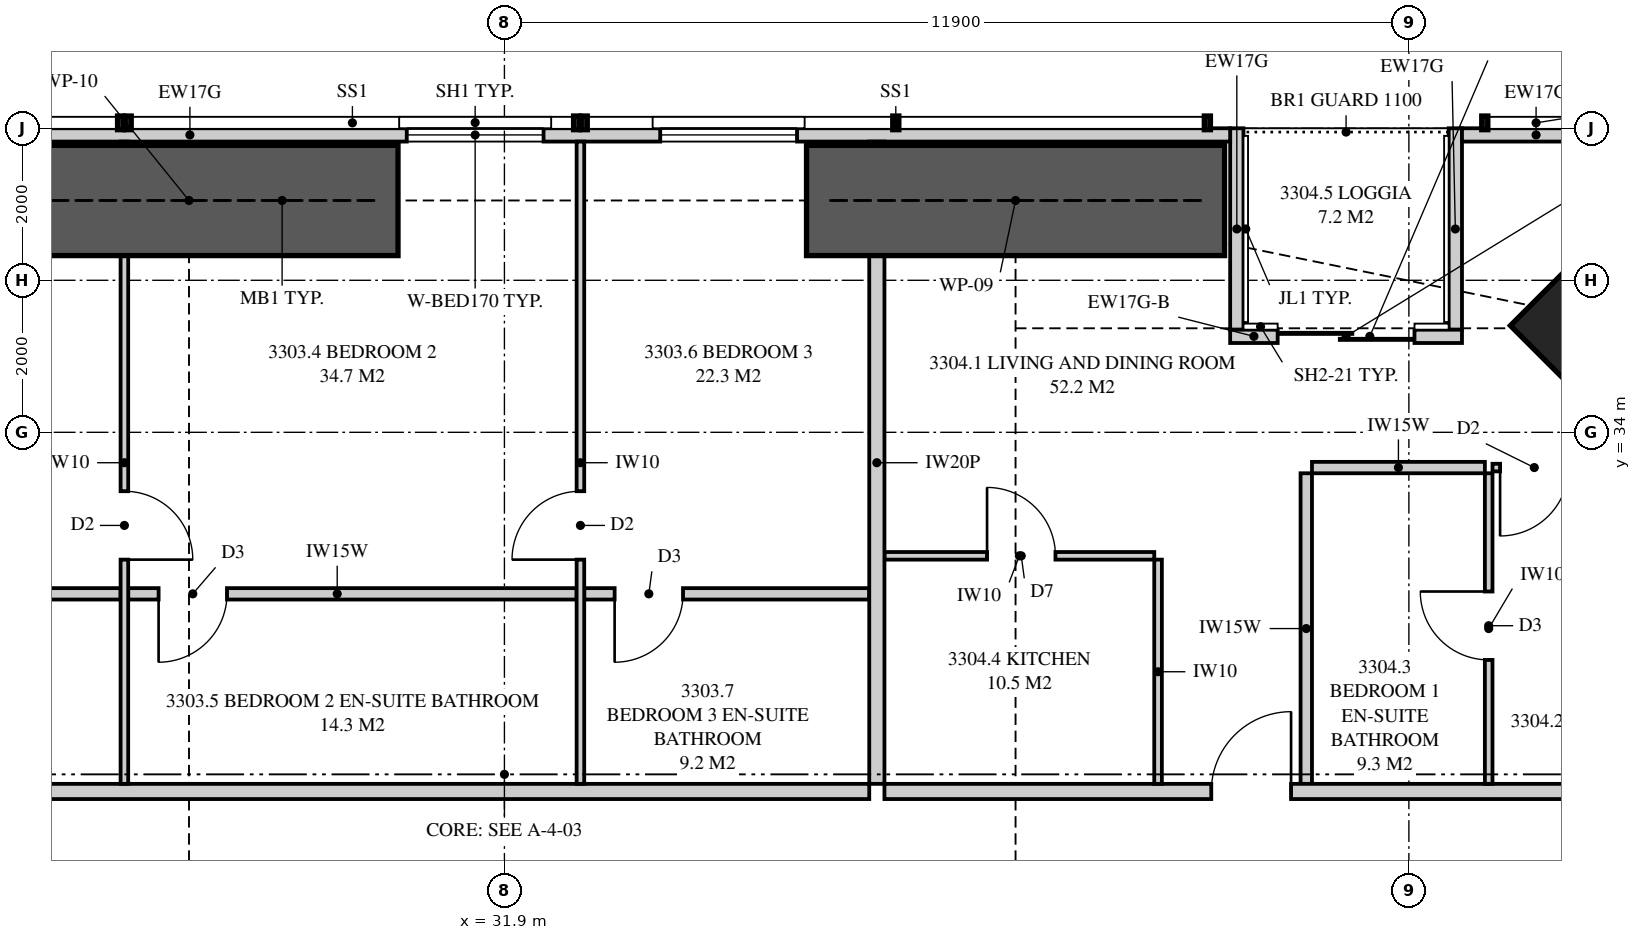
"""IFC4 building model, lengths in metres.
Left out: names, types, materials, properties, quantities, classifications, styles, units other than length and angle.
Written with IfcOpenShell. Run it as: python <this file> out.ifc"""

import sys

from ifc_helpers import new_model, si_unit, direction, frame, frame_2d, origin, origin_2d, place, context, subcontext, project, spatial, polyline, rectangle, outline, extrude, element, fill, save


model = new_model("IFC4")
c1 = context("Model", 3, precision=1e-05, world=origin(), true_north=direction((0.0, 1.0)))
c2 = subcontext(c1, "Body", "Model", "MODEL_VIEW")
j1 = project(units=[si_unit("LENGTHUNIT", "METRE"), si_unit("PLANEANGLEUNIT", "RADIAN")], contexts=[c1])
p1 = place(None, origin())
s1 = spatial("IfcSite", under=j1, at=p1, CompositionType="ELEMENT")
p2 = place(p1, origin())
s2 = spatial("IfcBuilding", under=s1, at=p2, CompositionType="ELEMENT")
p3 = place(p2, frame((0.0, 0.0, 121.6)))
s3 = spatial("IfcBuildingStorey", under=s2, at=p3, CompositionType="ELEMENT", Elevation=121.6)
p4 = place(p3, frame((46.869, 35.369, 0.0), z_axis=(0.0, 0.0, 1.0), x_axis=(-0.707106781187, -0.707106781187, 0.0)))
e1 = element("IfcColumn", 1, at=p4, inside=s3, PredefinedType="COLUMN", context=c2, shape_type="SweptSolid", body=[
    extrude(rectangle(XDim=2.4, YDim=2.5, at=origin_2d()), origin(), (0.0, 0.0, 1.0), 3.35),
])
p5 = place(p3, frame((46.449, 37.913, 0.0), z_axis=(0.0, 0.0, 1.0), x_axis=(-1.0, 0.0, 0.0)))
e2 = element("IfcWall", 2, at=p5, inside=s3, PredefinedType="SOLIDWALL", context=c2, shape_type="SweptSolid", body=[
    extrude(rectangle(XDim=1.95, YDim=0.175, at=frame_2d((0.975, 0.0))), origin(), (0.0, 0.0, 1.0), 3.11),
])
p6 = place(p3, frame((41.449, 37.913, 0.0), z_axis=(0.0, 0.0, 1.0), x_axis=(-1.0, 0.0, 0.0)))
e3 = element("IfcWall", 3, at=p6, inside=s3, PredefinedType="SOLIDWALL", context=c2, shape_type="SweptSolid", body=[
    extrude(outline(polyline([(0.0, 0.0), (27.374, 0.0), (27.374, 3.11), (24.777, 3.11), (24.777, 2.15), (24.732, 2.15), (24.732, 3.11), (24.574, 3.11), (24.574, 2.15), (2.824, 2.15), (2.824, 3.11), (2.666, 3.11), (2.666, 2.15), (2.62, 2.15), (2.62, 3.11), (0.0, 3.11), (0.0, 0.0)])), frame((0.0, 0.087, 0.0), z_axis=(0.0, -1.0, 0.0), x_axis=(1.0, 0.0, 0.0)), (0.0, 0.0, 1.0), 0.175),
])
p7 = place(p6, frame((5.699, 0.0, 0.4)))
e4 = element("IfcOpeningElement", 4, at=p7, cuts=e3, PredefinedType="OPENING", context=c2, shape_type="SweptSolid", body=[
    extrude(rectangle(XDim=1.8, YDim=1.7, at=frame_2d((0.9, 0.85))), frame((0.0, 0.097, 0.0), z_axis=(0.0, -1.0, 0.0), x_axis=(1.0, 0.0, 0.0)), (0.0, 0.0, 1.0), 0.195),
])
p8 = place(p6, frame((9.034, 0.0, 0.4)))
e5 = element("IfcOpeningElement", 5, at=p8, cuts=e3, PredefinedType="OPENING", context=c2, shape_type="SweptSolid", body=[
    extrude(rectangle(XDim=1.8, YDim=1.7, at=frame_2d((0.9, 0.85))), frame((0.0, 0.097, 0.0), z_axis=(0.0, -1.0, 0.0), x_axis=(1.0, 0.0, 0.0)), (0.0, 0.0, 1.0), 0.195),
])
p9 = place(p6, frame((16.558, 0.0, 0.4)))
e6 = element("IfcOpeningElement", 6, at=p9, cuts=e3, PredefinedType="OPENING", context=c2, shape_type="SweptSolid", body=[
    extrude(rectangle(XDim=1.8, YDim=1.7, at=frame_2d((0.9, 0.85))), frame((0.0, 0.097, 0.0), z_axis=(0.0, -1.0, 0.0), x_axis=(1.0, 0.0, 0.0)), (0.0, 0.0, 1.0), 0.195),
])
p10 = place(p6, frame((19.724, 0.0, 0.4)))
e7 = element("IfcOpeningElement", 7, at=p10, cuts=e3, PredefinedType="OPENING", context=c2, shape_type="SweptSolid", body=[
    extrude(rectangle(XDim=1.8, YDim=1.7, at=frame_2d((0.9, 0.85))), frame((0.0, 0.097, 0.0), z_axis=(0.0, -1.0, 0.0), x_axis=(1.0, 0.0, 0.0)), (0.0, 0.0, 1.0), 0.195),
])
p11 = place(p3, frame((44.499, 35.262, 0.0), z_axis=(0.0, 0.0, 1.0), x_axis=(-1.0, 0.0, 0.0)))
e8 = element("IfcWall", 8, at=p11, inside=s3, PredefinedType="SOLIDWALL", context=c2, shape_type="SweptSolid", body=[
    extrude(rectangle(XDim=2.425, YDim=0.175, at=frame_2d((1.212, 0.0))), origin(), (0.0, 0.0, 1.0), 2.15),
])
p12 = place(p11, frame((0.625, 0.0, 0.0)))
e9 = element("IfcOpeningElement", 9, at=p12, cuts=e8, PredefinedType="OPENING", context=c2, shape_type="SweptSolid", body=[
    extrude(rectangle(XDim=1.8, YDim=2.1, at=frame_2d((0.9, 1.05))), frame((0.0, 0.097, 0.0), z_axis=(0.0, -1.0, 0.0), x_axis=(1.0, 0.0, 0.0)), (0.0, 0.0, 1.0), 0.195),
])
p13 = place(p3, frame((42.074, 35.262, 0.0), z_axis=(0.0, 0.0, 1.0), x_axis=(-1.0, 0.0, 0.0)))
e10 = element("IfcWall", 10, at=p13, inside=s3, PredefinedType="SOLIDWALL", context=c2, shape_type="SweptSolid", body=[
    extrude(rectangle(XDim=0.625, YDim=0.175, at=frame_2d((0.312, 0.0))), origin(), (0.0, 0.0, 1.0), 2.51),
])
p14 = place(p3, frame((44.411, 38.0, 0.0), z_axis=(0.0, 0.0, 1.0), x_axis=(0.0, -1.0, 0.0)))
e11 = element("IfcWall", 11, at=p14, inside=s3, PredefinedType="SOLIDWALL", context=c2, shape_type="SweptSolid", body=[
    extrude(outline(polyline([(0.0, 0.0), (2.65, 0.0), (2.65, 2.15), (1.296, 2.15), (1.296, 3.11), (0.0, 3.11), (0.0, 0.0)])), frame((0.0, 0.087, 0.0), z_axis=(0.0, -1.0, 0.0), x_axis=(1.0, 0.0, 0.0)), (0.0, 0.0, 1.0), 0.175),
])
p15 = place(p3, frame((41.536, 38.0, 0.0), z_axis=(0.0, 0.0, 1.0), x_axis=(0.0, -1.0, 0.0)))
e12 = element("IfcWall", 12, at=p15, inside=s3, PredefinedType="SOLIDWALL", context=c2, shape_type="SweptSolid", body=[
    extrude(outline(polyline([(0.0, 0.0), (2.65, 0.0), (2.65, 2.51), (2.378, 2.51), (2.378, 2.15), (0.709, 2.15), (0.709, 3.11), (0.0, 3.11), (0.0, 0.0)])), frame((0.0, 0.087, 0.0), z_axis=(0.0, -1.0, 0.0), x_axis=(1.0, 0.0, 0.0)), (0.0, 0.0, 1.0), 0.175),
])
p16 = place(p3, frame((36.8, 37.825, 0.0), z_axis=(0.0, 0.0, 1.0), x_axis=(0.0, -1.0, 0.0)))
e13 = element("IfcWall", 13, at=p16, inside=s3, PredefinedType="PARTITIONING", context=c2, shape_type="SweptSolid", body=[
    extrude(outline(polyline([(0.529, 2.15), (0.0, 2.15), (0.0, 0.0), (0.529, 0.0), (0.529, 0.256), (1.021, 0.256), (1.021, 0.0), (8.45, 0.0), (8.45, 3.11), (1.685, 3.11), (1.685, 2.15), (1.021, 2.15), (1.021, 1.894), (0.529, 1.894), (0.529, 2.15)])), frame((0.0, 0.1, 0.0), z_axis=(0.0, -1.0, 0.0), x_axis=(1.0, 0.0, 0.0)), (0.0, 0.0, 1.0), 0.2),
])
p17 = place(p3, frame((17.775, 29.275, 0.0), z_axis=(0.0, 0.0, 1.0), x_axis=(1.0, 0.0, 0.0)))
e14 = element("IfcWall", 14, at=p17, inside=s3, PredefinedType="PARTITIONING", context=c2, shape_type="SweptSolid", body=[
    extrude(outline(polyline([(0.0, 0.0), (18.925, 0.0), (18.925, 3.11), (10.312, 3.11), (10.312, 2.541), (9.638, 2.541), (9.638, 3.11), (0.0, 3.11), (0.0, 0.0)])), frame((0.0, 0.1, 0.0), z_axis=(0.0, -1.0, 0.0), x_axis=(1.0, 0.0, 0.0)), (0.0, 0.0, 1.0), 0.2),
])
p18 = place(p17, frame((3.125, 0.0, 0.0)))
e15 = element("IfcOpeningElement", 15, at=p18, cuts=e14, PredefinedType="OPENING", context=c2, shape_type="SweptSolid", body=[
    extrude(rectangle(XDim=1.05, YDim=2.2, at=frame_2d((0.525, 1.1))), frame((0.0, 0.11, 0.0), z_axis=(0.0, -1.0, 0.0), x_axis=(1.0, 0.0, 0.0)), (0.0, 0.0, 1.0), 0.22),
])
p19 = place(p3, frame((26.9, 37.825, 0.0), z_axis=(0.0, 0.0, 1.0), x_axis=(0.0, -1.0, 0.0)))
e16 = element("IfcWall", 16, at=p19, inside=s3, PredefinedType="PARTITIONING", context=c2, shape_type="SweptSolid", body=[
    extrude(outline(polyline([(0.529, 2.15), (0.0, 2.15), (0.0, 0.0), (0.529, 0.0), (0.529, 0.889), (1.021, 0.889), (1.021, 0.0), (8.45, 0.0), (8.45, 3.11), (1.635, 3.11), (1.635, 2.15), (1.021, 2.15), (1.021, 1.261), (0.529, 1.261), (0.529, 2.15)])), frame((0.0, 0.05, 0.0), z_axis=(0.0, -1.0, 0.0), x_axis=(1.0, 0.0, 0.0)), (0.0, 0.0, 1.0), 0.1),
])
p20 = place(p19, frame((4.6, 0.0, 0.0)))
e17 = element("IfcOpeningElement", 17, at=p20, cuts=e16, PredefinedType="OPENING", context=c2, shape_type="SweptSolid", body=[
    extrude(rectangle(XDim=0.9, YDim=2.1, at=frame_2d((0.45, 1.05))), frame((0.0, 0.06, 0.0), z_axis=(0.0, -1.0, 0.0), x_axis=(1.0, 0.0, 0.0)), (0.0, 0.0, 1.0), 0.12),
])
p21 = place(p3, frame((32.9, 37.825, 0.0), z_axis=(0.0, 0.0, 1.0), x_axis=(0.0, -1.0, 0.0)))
e18 = element("IfcWall", 18, at=p21, inside=s3, PredefinedType="PARTITIONING", context=c2, shape_type="SweptSolid", body=[
    extrude(outline(polyline([(0.0, 0.0), (8.45, 0.0), (8.45, 3.11), (1.635, 3.11), (1.635, 2.15), (0.0, 2.15), (0.0, 3.11), (0.0, 0.0)])), frame((0.0, 0.05, 0.0), z_axis=(0.0, -1.0, 0.0), x_axis=(1.0, 0.0, 0.0)), (0.0, 0.0, 1.0), 0.1),
])
p22 = place(p21, frame((4.6, 0.0, 0.0)))
e19 = element("IfcOpeningElement", 19, at=p22, cuts=e18, PredefinedType="OPENING", context=c2, shape_type="SweptSolid", body=[
    extrude(rectangle(XDim=0.9, YDim=2.1, at=frame_2d((0.45, 1.05))), frame((0.0, 0.06, 0.0), z_axis=(0.0, -1.0, 0.0), x_axis=(1.0, 0.0, 0.0)), (0.0, 0.0, 1.0), 0.12),
])
p23 = place(p3, frame((22.7, 31.875, 0.0), z_axis=(0.0, 0.0, 1.0), x_axis=(1.0, 0.0, 0.0)))
e20 = element("IfcWall", 20, at=p23, inside=s3, PredefinedType="PLUMBINGWALL", context=c2, shape_type="SweptSolid", body=[
    extrude(rectangle(XDim=4.15, YDim=0.15, at=frame_2d((2.075, 0.0))), origin(), (0.0, 0.0, 1.0), 3.11),
])
p24 = place(p23, frame((0.4, 0.0, 0.0)))
e21 = element("IfcOpeningElement", 21, at=p24, cuts=e20, PredefinedType="OPENING", context=c2, shape_type="SweptSolid", body=[
    extrude(rectangle(XDim=0.9, YDim=2.1, at=frame_2d((0.45, 1.05))), frame((0.0, 0.085, 0.0), z_axis=(0.0, -1.0, 0.0), x_axis=(1.0, 0.0, 0.0)), (0.0, 0.0, 1.0), 0.17),
])
p25 = place(p3, frame((26.95, 31.875, 0.0), z_axis=(0.0, 0.0, 1.0), x_axis=(1.0, 0.0, 0.0)))
e22 = element("IfcWall", 22, at=p25, inside=s3, PredefinedType="PLUMBINGWALL", context=c2, shape_type="SweptSolid", body=[
    extrude(outline(polyline([(0.0, 0.0), (5.9, 0.0), (5.9, 3.11), (1.112, 3.11), (1.112, 2.541), (0.488, 2.541), (0.488, 3.11), (0.0, 3.11), (0.0, 0.0)])), frame((0.0, 0.075, 0.0), z_axis=(0.0, -1.0, 0.0), x_axis=(1.0, 0.0, 0.0)), (0.0, 0.0, 1.0), 0.15),
])
p26 = place(p25, frame((0.4, 0.0, 0.0)))
e23 = element("IfcOpeningElement", 23, at=p26, cuts=e22, PredefinedType="OPENING", context=c2, shape_type="SweptSolid", body=[
    extrude(rectangle(XDim=0.9, YDim=2.1, at=frame_2d((0.45, 1.05))), frame((0.0, 0.085, 0.0), z_axis=(0.0, -1.0, 0.0), x_axis=(1.0, 0.0, 0.0)), (0.0, 0.0, 1.0), 0.17),
])
p27 = place(p3, frame((32.95, 31.875, 0.0), z_axis=(0.0, 0.0, 1.0), x_axis=(1.0, 0.0, 0.0)))
e24 = element("IfcWall", 24, at=p27, inside=s3, PredefinedType="PLUMBINGWALL", context=c2, shape_type="SweptSolid", body=[
    extrude(rectangle(XDim=3.75, YDim=0.15, at=frame_2d((1.875, 0.0))), origin(), (0.0, 0.0, 1.0), 3.11),
])
p28 = place(p27, frame((0.4, 0.0, 0.0)))
e25 = element("IfcOpeningElement", 25, at=p28, cuts=e24, PredefinedType="OPENING", context=c2, shape_type="SweptSolid", body=[
    extrude(rectangle(XDim=0.9, YDim=2.1, at=frame_2d((0.45, 1.05))), frame((0.0, 0.085, 0.0), z_axis=(0.0, -1.0, 0.0), x_axis=(1.0, 0.0, 0.0)), (0.0, 0.0, 1.0), 0.17),
])
p29 = place(p3, frame((36.9, 29.275, 0.0), z_axis=(0.0, 0.0, 1.0), x_axis=(1.0, 0.0, 0.0)))
e26 = element("IfcWall", 26, at=p29, inside=s3, PredefinedType="PARTITIONING", context=c2, shape_type="SweptSolid", body=[
    extrude(outline(polyline([(0.0, 0.0), (9.125, 0.0), (9.125, 3.11), (2.062, 3.11), (2.062, 2.541), (1.388, 2.541), (1.388, 3.11), (0.0, 3.11), (0.0, 0.0)])), frame((0.0, 0.1, 0.0), z_axis=(0.0, -1.0, 0.0), x_axis=(1.0, 0.0, 0.0)), (0.0, 0.0, 1.0), 0.2),
])
p30 = place(p29, frame((4.3, 0.0, 0.0)))
e27 = element("IfcOpeningElement", 27, at=p30, cuts=e26, PredefinedType="OPENING", context=c2, shape_type="SweptSolid", body=[
    extrude(rectangle(XDim=1.05, YDim=2.2, at=frame_2d((0.525, 1.1))), frame((0.0, 0.11, 0.0), z_axis=(0.0, -1.0, 0.0), x_axis=(1.0, 0.0, 0.0)), (0.0, 0.0, 1.0), 0.22),
])
p31 = place(p3, frame((44.85, 33.461, 0.0), z_axis=(0.0, 0.0, 1.0), x_axis=(0.0, -1.0, 0.0)))
e28 = element("IfcWall", 28, at=p31, inside=s3, PredefinedType="PARTITIONING", context=c2, shape_type="SweptSolid", body=[
    extrude(rectangle(XDim=4.086, YDim=0.1, at=frame_2d((2.043, 0.0))), origin(), (0.0, 0.0, 1.0), 3.11),
])
p32 = place(p31, frame((1.556, 0.0, 0.0)))
e29 = element("IfcOpeningElement", 29, at=p32, cuts=e28, PredefinedType="OPENING", context=c2, shape_type="SweptSolid", body=[
    extrude(rectangle(XDim=0.9, YDim=2.1, at=frame_2d((0.45, 1.05))), frame((0.0, 0.06, 0.0), z_axis=(0.0, -1.0, 0.0), x_axis=(1.0, 0.0, 0.0)), (0.0, 0.0, 1.0), 0.12),
])
p33 = place(p3, frame((44.9, 33.536, 0.0), z_axis=(0.0, 0.0, 1.0), x_axis=(1.0, 0.0, 0.0)))
e30 = element("IfcWall", 30, at=p33, inside=s3, PredefinedType="PARTITIONING", context=c2, shape_type="SweptSolid", body=[
    extrude(outline(polyline([(0.0, 0.0), (4.6, 0.0), (4.6, 3.11), (3.137, 3.11), (3.137, 2.15), (1.395, 2.15), (1.395, 3.11), (0.0, 3.11), (0.0, 0.0)])), frame((0.0, 0.05, 0.0), z_axis=(0.0, -1.0, 0.0), x_axis=(1.0, 0.0, 0.0)), (0.0, 0.0, 1.0), 0.1),
])
p34 = place(p33, frame((0.1, 0.0, 0.0)))
e31 = element("IfcOpeningElement", 31, at=p34, cuts=e30, PredefinedType="OPENING", context=c2, shape_type="SweptSolid", body=[
    extrude(rectangle(XDim=0.9, YDim=2.1, at=frame_2d((0.45, 1.05))), frame((0.0, 0.06, 0.0), z_axis=(0.0, -1.0, 0.0), x_axis=(1.0, 0.0, 0.0)), (0.0, 0.0, 1.0), 0.12),
])
p35 = place(p3, frame((42.525, 33.536, 0.0), z_axis=(0.0, 0.0, 1.0), x_axis=(1.0, 0.0, 0.0)))
e32 = element("IfcWall", 32, at=p35, inside=s3, PredefinedType="PLUMBINGWALL", context=c2, shape_type="SweptSolid", body=[
    extrude(rectangle(XDim=2.275, YDim=0.15, at=frame_2d((1.138, 0.0))), origin(), (0.0, 0.0, 1.0), 3.11),
])
p36 = place(p3, frame((42.45, 33.461, 0.0), z_axis=(0.0, 0.0, 1.0), x_axis=(0.0, -1.0, 0.0)))
e33 = element("IfcWall", 33, at=p36, inside=s3, PredefinedType="PLUMBINGWALL", context=c2, shape_type="SweptSolid", body=[
    extrude(rectangle(XDim=4.086, YDim=0.15, at=frame_2d((2.043, 0.0))), origin(), (0.0, 0.0, 1.0), 3.11),
])
p37 = place(p3, frame((36.9, 32.375, 0.0), z_axis=(0.0, 0.0, 1.0), x_axis=(1.0, 0.0, 0.0)))
e34 = element("IfcWall", 34, at=p37, inside=s3, PredefinedType="PARTITIONING", context=c2, shape_type="SweptSolid", body=[
    extrude(outline(polyline([(0.0, 0.0), (3.55, 0.0), (3.55, 3.11), (2.012, 3.11), (2.012, 2.541), (1.438, 2.541), (1.438, 3.11), (0.0, 3.11), (0.0, 0.0)])), frame((0.0, 0.05, 0.0), z_axis=(0.0, -1.0, 0.0), x_axis=(1.0, 0.0, 0.0)), (0.0, 0.0, 1.0), 0.1),
])
p38 = place(p37, frame((1.35, 0.0, 0.0)))
e35 = element("IfcOpeningElement", 35, at=p38, cuts=e34, PredefinedType="OPENING", context=c2, shape_type="SweptSolid", body=[
    extrude(rectangle(XDim=0.9, YDim=2.1, at=frame_2d((0.45, 1.05))), frame((0.0, 0.06, 0.0), z_axis=(0.0, -1.0, 0.0), x_axis=(1.0, 0.0, 0.0)), (0.0, 0.0, 1.0), 0.12),
])
p39 = place(p3, frame((40.5, 32.325, 0.0), z_axis=(0.0, 0.0, 1.0), x_axis=(0.0, -1.0, 0.0)))
e36 = element("IfcWall", 36, at=p39, inside=s3, PredefinedType="PARTITIONING", context=c2, shape_type="SweptSolid", body=[
    extrude(rectangle(XDim=2.95, YDim=0.1, at=frame_2d((1.475, 0.0))), origin(), (0.0, 0.0, 1.0), 3.11),
])
for number, where, z_axis, x_axis in (
    (37, (35.875, 37.05, 0.0), (0.0, 0.0, 1.0), (1.0, 0.0, 0.0)),
    (38, (25.0, 37.05, 0.0), (0.0, 0.0, 1.0), (1.0, 0.0, 0.0)),
):
    element("IfcWall", number, at=place(p3, frame(where, z_axis=z_axis, x_axis=x_axis)), inside=s3, PredefinedType="SHEAR", context=c2, shape_type="SweptSolid", body=[
        extrude(rectangle(XDim=5.5, YDim=1.45, at=frame_2d((2.75, 0.0))), origin(), (0.0, 0.0, 1.0), 3.35),
    ])
p40 = place(p12, origin())
e39 = element("IfcDoor", 39, at=p40, inside=s3, OperationType="SLIDING_TO_LEFT", PredefinedType="DOOR", context=c2, shape_type="SweptSolid", body=[
    extrude(rectangle(XDim=1.8, YDim=2.1, at=frame_2d((0.9, 1.05))), frame((0.0, 0.025, 0.0), z_axis=(0.0, -1.0, 0.0), x_axis=(1.0, 0.0, 0.0)), (0.0, 0.0, 1.0), 0.05),
])
fill(e9, e39)
p41 = place(p7, origin())
e40 = element("IfcWindow", 40, at=p41, inside=s3, PartitioningType="SINGLE_PANEL", PredefinedType="WINDOW", context=c2, shape_type="SweptSolid", body=[
    extrude(rectangle(XDim=1.8, YDim=1.7, at=frame_2d((0.9, 0.85))), frame((0.0, 0.03, 0.0), z_axis=(0.0, -1.0, 0.0), x_axis=(1.0, 0.0, 0.0)), (0.0, 0.0, 1.0), 0.06),
])
fill(e4, e40)
p42 = place(p8, origin())
e41 = element("IfcWindow", 41, at=p42, inside=s3, PartitioningType="SINGLE_PANEL", PredefinedType="WINDOW", context=c2, shape_type="SweptSolid", body=[
    extrude(rectangle(XDim=1.8, YDim=1.7, at=frame_2d((0.9, 0.85))), frame((0.0, 0.03, 0.0), z_axis=(0.0, -1.0, 0.0), x_axis=(1.0, 0.0, 0.0)), (0.0, 0.0, 1.0), 0.06),
])
fill(e5, e41)
p43 = place(p20, origin())
e42 = element("IfcDoor", 42, at=p43, inside=s3, OperationType="SINGLE_SWING_RIGHT", PredefinedType="DOOR", context=c2, shape_type="SweptSolid", body=[
    extrude(rectangle(XDim=0.9, YDim=2.1, at=frame_2d((0.45, 1.05))), frame((0.0, 0.025, 0.0), z_axis=(0.0, -1.0, 0.0), x_axis=(1.0, 0.0, 0.0)), (0.0, 0.0, 1.0), 0.05),
])
fill(e17, e42)
p44 = place(p26, frame((0.9, 0.0, 0.0), z_axis=(0.0, 0.0, 1.0), x_axis=(-1.0, 0.0, 0.0)))
e43 = element("IfcDoor", 43, at=p44, inside=s3, OperationType="SINGLE_SWING_RIGHT", PredefinedType="DOOR", context=c2, shape_type="SweptSolid", body=[
    extrude(rectangle(XDim=0.9, YDim=2.1, at=frame_2d((0.45, 1.05))), frame((0.0, 0.025, 0.0), z_axis=(0.0, -1.0, 0.0), x_axis=(1.0, 0.0, 0.0)), (0.0, 0.0, 1.0), 0.05),
])
fill(e23, e43)
p45 = place(p22, frame((0.9, 0.0, 0.0), z_axis=(0.0, 0.0, 1.0), x_axis=(-1.0, 0.0, 0.0)))
e44 = element("IfcDoor", 44, at=p45, inside=s3, OperationType="SINGLE_SWING_LEFT", PredefinedType="DOOR", context=c2, shape_type="SweptSolid", body=[
    extrude(rectangle(XDim=0.9, YDim=2.1, at=frame_2d((0.45, 1.05))), frame((0.0, 0.025, 0.0), z_axis=(0.0, -1.0, 0.0), x_axis=(1.0, 0.0, 0.0)), (0.0, 0.0, 1.0), 0.05),
])
fill(e19, e44)
p46 = place(p28, frame((0.9, 0.0, 0.0), z_axis=(0.0, 0.0, 1.0), x_axis=(-1.0, 0.0, 0.0)))
e45 = element("IfcDoor", 45, at=p46, inside=s3, OperationType="SINGLE_SWING_RIGHT", PredefinedType="DOOR", context=c2, shape_type="SweptSolid", body=[
    extrude(rectangle(XDim=0.9, YDim=2.1, at=frame_2d((0.45, 1.05))), frame((0.0, 0.025, 0.0), z_axis=(0.0, -1.0, 0.0), x_axis=(1.0, 0.0, 0.0)), (0.0, 0.0, 1.0), 0.05),
])
fill(e25, e45)
p47 = place(p30, origin())
e46 = element("IfcDoor", 46, at=p47, inside=s3, OperationType="SINGLE_SWING_RIGHT", PredefinedType="DOOR", context=c2, shape_type="SweptSolid", body=[
    extrude(rectangle(XDim=1.05, YDim=2.2, at=frame_2d((0.525, 1.1))), frame((0.0, 0.025, 0.0), z_axis=(0.0, -1.0, 0.0), x_axis=(1.0, 0.0, 0.0)), (0.0, 0.0, 1.0), 0.05),
])
fill(e27, e46)
p48 = place(p34, frame((0.9, 0.0, 0.0), z_axis=(0.0, 0.0, 1.0), x_axis=(-1.0, 0.0, 0.0)))
e47 = element("IfcDoor", 47, at=p48, inside=s3, OperationType="SINGLE_SWING_RIGHT", PredefinedType="DOOR", context=c2, shape_type="SweptSolid", body=[
    extrude(rectangle(XDim=0.9, YDim=2.1, at=frame_2d((0.45, 1.05))), frame((0.0, 0.025, 0.0), z_axis=(0.0, -1.0, 0.0), x_axis=(1.0, 0.0, 0.0)), (0.0, 0.0, 1.0), 0.05),
])
fill(e31, e47)
p49 = place(p32, frame((0.9, 0.0, 0.0), z_axis=(0.0, 0.0, 1.0), x_axis=(-1.0, 0.0, 0.0)))
e48 = element("IfcDoor", 48, at=p49, inside=s3, OperationType="SINGLE_SWING_RIGHT", PredefinedType="DOOR", context=c2, shape_type="SweptSolid", body=[
    extrude(rectangle(XDim=0.9, YDim=2.1, at=frame_2d((0.45, 1.05))), frame((0.0, 0.025, 0.0), z_axis=(0.0, -1.0, 0.0), x_axis=(1.0, 0.0, 0.0)), (0.0, 0.0, 1.0), 0.05),
])
fill(e29, e48)
p50 = place(p38, origin())
e49 = element("IfcDoor", 49, at=p50, inside=s3, OperationType="SINGLE_SWING_LEFT", PredefinedType="DOOR", context=c2, shape_type="SweptSolid", body=[
    extrude(rectangle(XDim=0.9, YDim=2.1, at=frame_2d((0.45, 1.05))), frame((0.0, 0.025, 0.0), z_axis=(0.0, -1.0, 0.0), x_axis=(1.0, 0.0, 0.0)), (0.0, 0.0, 1.0), 0.05),
])
fill(e35, e49)
save(model, sys.argv[1])
